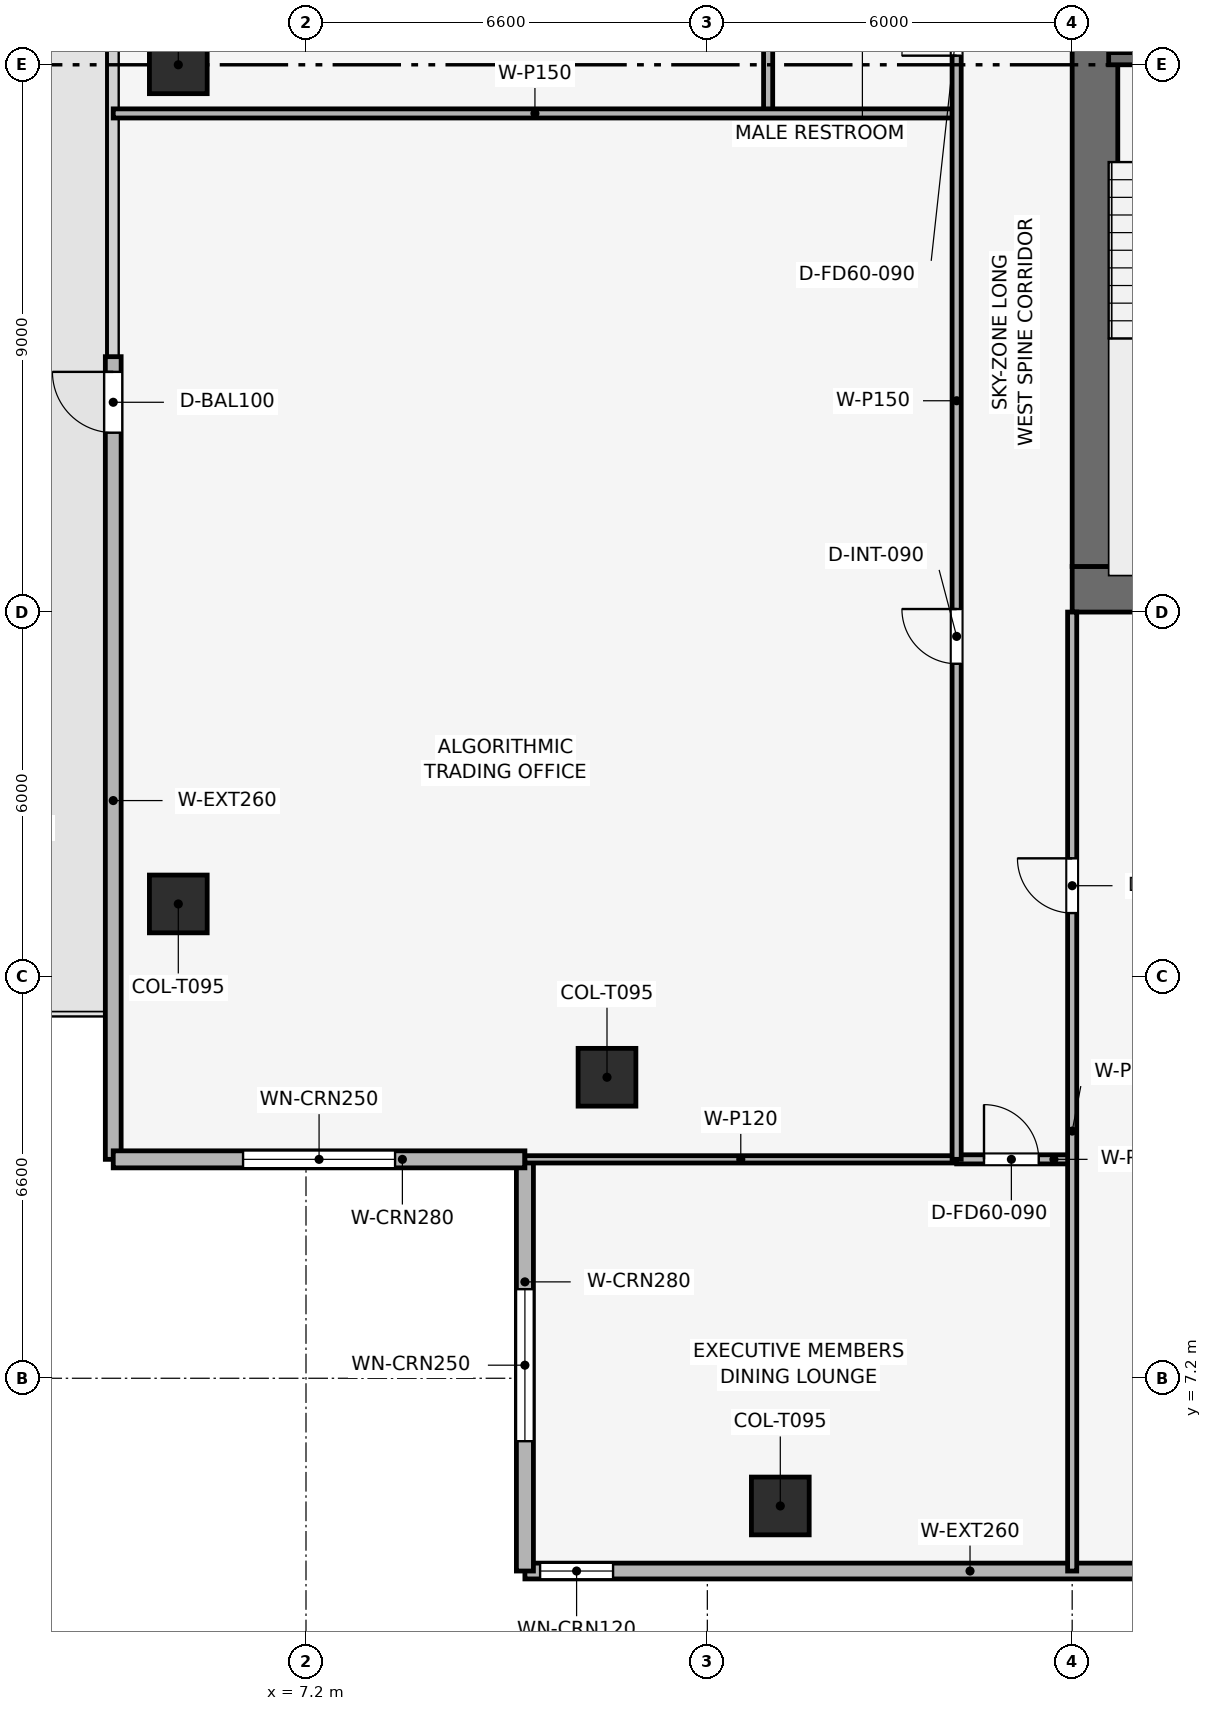
"""IFC4 building model, lengths in metres.
Left out: names, types, materials, properties, quantities, classifications, styles, units other than length and angle.
Written with IfcOpenShell. Run it as: python <this file> out.ifc"""

import sys

from ifc_helpers import new_model, si_unit, direction, frame, frame_2d, origin, origin_2d, place, context, subcontext, project, spatial, rectangle, extrude, element, fill, save


model = new_model("IFC4")
c1 = context("Model", 3, precision=1e-05, world=origin(), true_north=direction((0.0, 1.0)))
c2 = subcontext(c1, "Body", "Model", "MODEL_VIEW")
j1 = project(units=[si_unit("LENGTHUNIT", "METRE"), si_unit("PLANEANGLEUNIT", "RADIAN")], contexts=[c1])
p1 = place(None, origin())
s1 = spatial("IfcSite", under=j1, at=p1, CompositionType="ELEMENT")
p2 = place(p1, origin())
s2 = spatial("IfcBuilding", under=s1, at=p2, CompositionType="ELEMENT")
p3 = place(p2, frame((0.0, 0.0, 261.6)))
s3 = spatial("IfcBuildingStorey", under=s2, at=p3, CompositionType="ELEMENT", Elevation=261.6)
p4 = place(p3, frame((19.8, 20.175, 0.0), z_axis=(0.0, 0.0, 1.0), x_axis=(1.0, 0.0, 0.0)))
e1 = element("IfcWall", 1, at=p4, inside=s3, PredefinedType="SHEAR", context=c2, shape_type="SweptSolid", body=[
    extrude(rectangle(XDim=18.0, YDim=0.75, at=frame_2d((9.0, 0.0))), origin(), (0.0, 0.0, 1.0), 3.75),
])
p5 = place(p3, frame((20.175, 20.55, 0.0), z_axis=(0.0, 0.0, 1.0), x_axis=(0.0, 1.0, 0.0)))
e2 = element("IfcWall", 2, at=p5, inside=s3, PredefinedType="SHEAR", context=c2, shape_type="SweptSolid", body=[
    extrude(rectangle(XDim=16.5, YDim=0.75, at=frame_2d((8.25, 0.0))), origin(), (0.0, 0.0, 1.0), 3.75),
])
p6 = place(p5, frame((10.25, 0.0, 0.0)))
e3 = element("IfcOpeningElement", 3, at=p6, cuts=e2, PredefinedType="OPENING", context=c2, shape_type="SweptSolid", body=[
    extrude(rectangle(XDim=1.1, YDim=2.15, at=frame_2d((0.55, 1.075))), frame((0.0, 0.385, 0.0), z_axis=(0.0, -1.0, 0.0), x_axis=(1.0, 0.0, 0.0)), (0.0, 0.0, 1.0), 0.77),
])
for number, where, z_axis, x_axis in (
    (4, (15.0, 5.1, 0.003), (0.0, 0.0, 1.0), (1.0, 0.0, 0.0)),
    (5, (5.1, 28.8, 0.003), (0.0, 0.0, 1.0), (1.0, 0.0, 0.0)),
    (6, (5.1, 15.0, 0.003), (0.0, 0.0, 1.0), (1.0, 0.0, 0.0)),
    (7, (12.15, 12.15, 0.003), (0.0, 0.0, 1.0), (1.0, 0.0, 0.0)),
):
    element("IfcColumn", number, at=place(p3, frame(where, z_axis=z_axis, x_axis=x_axis)), inside=s3, PredefinedType="COLUMN", context=c2, shape_type="SweptSolid", body=[
        extrude(rectangle(XDim=0.95, YDim=0.95, at=origin_2d()), origin(), (0.0, 0.0, 1.0), 3.494),
    ])
p7 = place(p3, frame((24.0, 4.03, 0.0), z_axis=(0.0, 0.0, 1.0), x_axis=(-1.0, 0.0, 0.0)))
e8 = element("IfcWall", 8, at=p7, inside=s3, PredefinedType="SOLIDWALL", context=c2, shape_type="SweptSolid", body=[
    extrude(rectangle(XDim=13.2, YDim=0.26, at=frame_2d((6.6, 0.0))), origin(), (0.0, 0.0, 1.0), 3.5),
])
p8 = place(p7, frame((11.75, 0.0, 0.9)))
e9 = element("IfcOpeningElement", 9, at=p8, cuts=e8, PredefinedType="OPENING", context=c2, shape_type="SweptSolid", body=[
    extrude(rectangle(XDim=1.2, YDim=2.1, at=frame_2d((0.6, 1.05))), frame((0.0, 0.14, 0.0), z_axis=(0.0, -1.0, 0.0), x_axis=(1.0, 0.0, 0.0)), (0.0, 0.0, 1.0), 0.28),
])
p9 = place(p3, frame((4.03, 10.8, 0.0), z_axis=(0.0, 0.0, 1.0), x_axis=(0.0, 1.0, 0.0)))
e10 = element("IfcWall", 10, at=p9, inside=s3, PredefinedType="SOLIDWALL", context=c2, shape_type="SweptSolid", body=[
    extrude(rectangle(XDim=13.2, YDim=0.26, at=frame_2d((6.6, 0.0))), origin(), (0.0, 0.0, 1.0), 3.5),
])
p10 = place(p9, frame((11.95, 0.0, 0.0)))
e11 = element("IfcOpeningElement", 11, at=p10, cuts=e10, PredefinedType="OPENING", context=c2, shape_type="SweptSolid", body=[
    extrude(rectangle(XDim=1.0, YDim=2.2, at=frame_2d((0.5, 1.1))), frame((0.0, 0.14, 0.0), z_axis=(0.0, -1.0, 0.0), x_axis=(1.0, 0.0, 0.0)), (0.0, 0.0, 1.0), 0.28),
])
p11 = place(p3, frame((10.8, 4.03, 0.0), z_axis=(0.0, 0.0, 1.0), x_axis=(0.0, 1.0, 0.0)))
e12 = element("IfcWall", 12, at=p11, inside=s3, PredefinedType="SOLIDWALL", context=c2, shape_type="SweptSolid", body=[
    extrude(rectangle(XDim=6.77, YDim=0.28, at=frame_2d((3.385, 0.0))), origin(), (0.0, 0.0, 1.0), 3.5),
])
p12 = place(p11, frame((2.135, 0.0, 0.9)))
e13 = element("IfcOpeningElement", 13, at=p12, cuts=e12, PredefinedType="OPENING", context=c2, shape_type="SweptSolid", body=[
    extrude(rectangle(XDim=2.5, YDim=1.9, at=frame_2d((1.25, 0.95))), frame((0.0, 0.15, 0.0), z_axis=(0.0, -1.0, 0.0), x_axis=(1.0, 0.0, 0.0)), (0.0, 0.0, 1.0), 0.3),
])
p13 = place(p3, frame((10.8, 10.8, 0.0), z_axis=(0.0, 0.0, 1.0), x_axis=(-1.0, 0.0, 0.0)))
e14 = element("IfcWall", 14, at=p13, inside=s3, PredefinedType="SOLIDWALL", context=c2, shape_type="SweptSolid", body=[
    extrude(rectangle(XDim=6.77, YDim=0.28, at=frame_2d((3.385, 0.0))), origin(), (0.0, 0.0, 1.0), 3.5),
])
p14 = place(p13, frame((2.135, 0.0, 0.9)))
e15 = element("IfcOpeningElement", 15, at=p14, cuts=e14, PredefinedType="OPENING", context=c2, shape_type="SweptSolid", body=[
    extrude(rectangle(XDim=2.5, YDim=1.9, at=frame_2d((1.25, 0.95))), frame((0.0, 0.15, 0.0), z_axis=(0.0, -1.0, 0.0), x_axis=(1.0, 0.0, 0.0)), (0.0, 0.0, 1.0), 0.3),
])
p15 = place(p3, frame((20.4, 28.9, 0.0), z_axis=(0.0, 0.0, 1.0), x_axis=(1.0, 0.0, 0.0)))
e16 = element("IfcWall", 16, at=p15, inside=s3, PredefinedType="SHEAR", context=c2, shape_type="SweptSolid", body=[
    extrude(rectangle(XDim=3.15, YDim=0.2, at=frame_2d((1.575, 0.0))), origin(), (0.0, 0.0, 1.0), 3.5),
])
p16 = place(p15, frame((0.8, 0.0, 0.0)))
e17 = element("IfcOpeningElement", 17, at=p16, cuts=e16, PredefinedType="OPENING", context=c2, shape_type="SweptSolid", body=[
    extrude(rectangle(XDim=1.0, YDim=2.1, at=frame_2d((0.5, 1.05))), frame((0.0, 0.11, 0.0), z_axis=(0.0, -1.0, 0.0), x_axis=(1.0, 0.0, 0.0)), (0.0, 0.0, 1.0), 0.22),
])
p17 = place(p3, frame((14.8, 28.0, 0.0), z_axis=(0.0, 0.0, 1.0), x_axis=(0.0, 1.0, 0.0)))
e18 = element("IfcWall", 18, at=p17, inside=s3, PredefinedType="PARTITIONING", context=c2, shape_type="SweptSolid", body=[
    extrude(rectangle(XDim=11.7, YDim=0.15, at=frame_2d((5.85, 0.0))), origin(), (0.0, 0.0, 1.0), 3.085),
])
p18 = place(p17, frame((9.6, 0.0, 0.0)))
e19 = element("IfcOpeningElement", 19, at=p18, cuts=e18, PredefinedType="OPENING", context=c2, shape_type="SweptSolid", body=[
    extrude(rectangle(XDim=0.9, YDim=2.1, at=frame_2d((0.45, 1.05))), frame((0.0, 0.085, 0.0), z_axis=(0.0, -1.0, 0.0), x_axis=(1.0, 0.0, 0.0)), (0.0, 0.0, 1.0), 0.17),
])
p19 = place(p3, frame((4.03, 28.0, 0.0), z_axis=(0.0, 0.0, 1.0), x_axis=(1.0, 0.0, 0.0)))
e20 = element("IfcWall", 20, at=p19, inside=s3, PredefinedType="PARTITIONING", context=c2, shape_type="SweptSolid", body=[
    extrude(rectangle(XDim=13.87, YDim=0.15, at=frame_2d((6.935, 0.0))), origin(), (0.0, 0.0, 1.0), 3.085),
])
p20 = place(p3, frame((10.8, 10.8, 0.0), z_axis=(0.0, 0.0, 1.0), x_axis=(1.0, 0.0, 0.0)))
e21 = element("IfcWall", 21, at=p20, inside=s3, PredefinedType="PARTITIONING", context=c2, shape_type="SweptSolid", body=[
    extrude(rectangle(XDim=7.1, YDim=0.12, at=frame_2d((3.55, 0.0))), origin(), (0.0, 0.0, 1.0), 3.085),
])
p21 = place(p3, frame((17.9, 10.8, 0.0), z_axis=(0.0, 0.0, 1.0), x_axis=(1.0, 0.0, 0.0)))
e22 = element("IfcWall", 22, at=p21, inside=s3, PredefinedType="PARTITIONING", context=c2, shape_type="SweptSolid", body=[
    extrude(rectangle(XDim=1.9, YDim=0.15, at=frame_2d((0.95, 0.0))), origin(), (0.0, 0.0, 1.0), 3.5),
])
p22 = place(p21, frame((0.45, 0.0, 0.0)))
e23 = element("IfcOpeningElement", 23, at=p22, cuts=e22, PredefinedType="OPENING", context=c2, shape_type="SweptSolid", body=[
    extrude(rectangle(XDim=0.9, YDim=2.1, at=frame_2d((0.45, 1.05))), frame((0.0, 0.085, 0.0), z_axis=(0.0, -1.0, 0.0), x_axis=(1.0, 0.0, 0.0)), (0.0, 0.0, 1.0), 0.17),
])
p23 = place(p3, frame((19.8, 4.03, 0.0), z_axis=(0.0, 0.0, 1.0), x_axis=(0.0, 1.0, 0.0)))
e24 = element("IfcWall", 24, at=p23, inside=s3, PredefinedType="PARTITIONING", context=c2, shape_type="SweptSolid", body=[
    extrude(rectangle(XDim=15.77, YDim=0.15, at=frame_2d((7.885, 0.0))), origin(), (0.0, 0.0, 1.0), 3.085),
])
p24 = place(p23, frame((10.82, 0.0, 0.0)))
e25 = element("IfcOpeningElement", 25, at=p24, cuts=e24, PredefinedType="OPENING", context=c2, shape_type="SweptSolid", body=[
    extrude(rectangle(XDim=0.9, YDim=2.1, at=frame_2d((0.45, 1.05))), frame((0.0, 0.085, 0.0), z_axis=(0.0, -1.0, 0.0), x_axis=(1.0, 0.0, 0.0)), (0.0, 0.0, 1.0), 0.17),
])
p25 = place(p3, frame((17.9, 10.8, 0.0), z_axis=(0.0, 0.0, 1.0), x_axis=(0.0, 1.0, 0.0)))
e26 = element("IfcWall", 26, at=p25, inside=s3, PredefinedType="PARTITIONING", context=c2, shape_type="SweptSolid", body=[
    extrude(rectangle(XDim=28.9, YDim=0.15, at=frame_2d((14.45, 0.0))), origin(), (0.0, 0.0, 1.0), 3.085),
])
p26 = place(p25, frame((8.15, 0.0, 0.0)))
e27 = element("IfcOpeningElement", 27, at=p26, cuts=e26, PredefinedType="OPENING", context=c2, shape_type="SweptSolid", body=[
    extrude(rectangle(XDim=0.9, YDim=2.1, at=frame_2d((0.45, 1.05))), frame((0.0, 0.085, 0.0), z_axis=(0.0, -1.0, 0.0), x_axis=(1.0, 0.0, 0.0)), (0.0, 0.0, 1.0), 0.17),
])
p27 = place(p25, frame((18.15, 0.0, 0.0)))
e28 = element("IfcOpeningElement", 28, at=p27, cuts=e26, PredefinedType="OPENING", context=c2, shape_type="SweptSolid", body=[
    extrude(rectangle(XDim=0.9, YDim=2.1, at=frame_2d((0.45, 1.05))), frame((0.0, 0.085, 0.0), z_axis=(0.0, -1.0, 0.0), x_axis=(1.0, 0.0, 0.0)), (0.0, 0.0, 1.0), 0.17),
])
p28 = place(p25, frame((21.05, 0.0, 0.0)))
e29 = element("IfcOpeningElement", 29, at=p28, cuts=e26, PredefinedType="OPENING", context=c2, shape_type="SweptSolid", body=[
    extrude(rectangle(XDim=0.9, YDim=2.1, at=frame_2d((0.45, 1.05))), frame((0.0, 0.085, 0.0), z_axis=(0.0, -1.0, 0.0), x_axis=(1.0, 0.0, 0.0)), (0.0, 0.0, 1.0), 0.17),
])
p29 = place(p25, frame((23.8, 0.0, 0.0)))
e30 = element("IfcOpeningElement", 30, at=p29, cuts=e26, PredefinedType="OPENING", context=c2, shape_type="SweptSolid", body=[
    extrude(rectangle(XDim=0.95, YDim=2.1, at=frame_2d((0.475, 1.05))), frame((0.0, 0.085, 0.0), z_axis=(0.0, -1.0, 0.0), x_axis=(1.0, 0.0, 0.0)), (0.0, 0.0, 1.0), 0.17),
])
p30 = place(p25, frame((26.8, 0.0, 0.0)))
e31 = element("IfcOpeningElement", 31, at=p30, cuts=e26, PredefinedType="OPENING", context=c2, shape_type="SweptSolid", body=[
    extrude(rectangle(XDim=0.9, YDim=2.1, at=frame_2d((0.45, 1.05))), frame((0.0, 0.085, 0.0), z_axis=(0.0, -1.0, 0.0), x_axis=(1.0, 0.0, 0.0)), (0.0, 0.0, 1.0), 0.17),
])
p31 = place(p8, origin())
e32 = element("IfcWindow", 32, at=p31, inside=s3, PartitioningType="SINGLE_PANEL", PredefinedType="WINDOW", context=c2, shape_type="SweptSolid", body=[
    extrude(rectangle(XDim=1.2, YDim=2.1, at=frame_2d((0.6, 1.05))), frame((0.0, 0.03, 0.0), z_axis=(0.0, -1.0, 0.0), x_axis=(1.0, 0.0, 0.0)), (0.0, 0.0, 1.0), 0.06),
])
fill(e9, e32)
p32 = place(p10, origin())
e33 = element("IfcDoor", 33, at=p32, inside=s3, OperationType="SINGLE_SWING_RIGHT", PredefinedType="DOOR", context=c2, shape_type="SweptSolid", body=[
    extrude(rectangle(XDim=1.0, YDim=2.2, at=frame_2d((0.5, 1.1))), frame((0.0, 0.025, 0.0), z_axis=(0.0, -1.0, 0.0), x_axis=(1.0, 0.0, 0.0)), (0.0, 0.0, 1.0), 0.05),
])
fill(e11, e33)
p33 = place(p12, origin())
e34 = element("IfcWindow", 34, at=p33, inside=s3, PartitioningType="SINGLE_PANEL", PredefinedType="WINDOW", context=c2, shape_type="SweptSolid", body=[
    extrude(rectangle(XDim=2.5, YDim=1.9, at=frame_2d((1.25, 0.95))), frame((0.0, 0.03, 0.0), z_axis=(0.0, -1.0, 0.0), x_axis=(1.0, 0.0, 0.0)), (0.0, 0.0, 1.0), 0.06),
])
fill(e13, e34)
p34 = place(p14, origin())
e35 = element("IfcWindow", 35, at=p34, inside=s3, PartitioningType="SINGLE_PANEL", PredefinedType="WINDOW", context=c2, shape_type="SweptSolid", body=[
    extrude(rectangle(XDim=2.5, YDim=1.9, at=frame_2d((1.25, 0.95))), frame((0.0, 0.03, 0.0), z_axis=(0.0, -1.0, 0.0), x_axis=(1.0, 0.0, 0.0)), (0.0, 0.0, 1.0), 0.06),
])
fill(e15, e35)
p35 = place(p22, origin())
e36 = element("IfcDoor", 36, at=p35, inside=s3, OperationType="SINGLE_SWING_LEFT", PredefinedType="DOOR", context=c2, shape_type="SweptSolid", body=[
    extrude(rectangle(XDim=0.9, YDim=2.1, at=frame_2d((0.45, 1.05))), frame((0.0, 0.025, 0.0), z_axis=(0.0, -1.0, 0.0), x_axis=(1.0, 0.0, 0.0)), (0.0, 0.0, 1.0), 0.05),
])
fill(e23, e36)
p36 = place(p24, origin())
e37 = element("IfcDoor", 37, at=p36, inside=s3, OperationType="SINGLE_SWING_RIGHT", PredefinedType="DOOR", context=c2, shape_type="SweptSolid", body=[
    extrude(rectangle(XDim=0.9, YDim=2.1, at=frame_2d((0.45, 1.05))), frame((0.0, 0.025, 0.0), z_axis=(0.0, -1.0, 0.0), x_axis=(1.0, 0.0, 0.0)), (0.0, 0.0, 1.0), 0.05),
])
fill(e25, e37)
p37 = place(p26, origin())
e38 = element("IfcDoor", 38, at=p37, inside=s3, OperationType="SINGLE_SWING_RIGHT", PredefinedType="DOOR", context=c2, shape_type="SweptSolid", body=[
    extrude(rectangle(XDim=0.9, YDim=2.1, at=frame_2d((0.45, 1.05))), frame((0.0, 0.025, 0.0), z_axis=(0.0, -1.0, 0.0), x_axis=(1.0, 0.0, 0.0)), (0.0, 0.0, 1.0), 0.05),
])
fill(e27, e38)
p38 = place(p27, origin())
e39 = element("IfcDoor", 39, at=p38, inside=s3, OperationType="SINGLE_SWING_LEFT", PredefinedType="DOOR", context=c2, shape_type="SweptSolid", body=[
    extrude(rectangle(XDim=0.9, YDim=2.1, at=frame_2d((0.45, 1.05))), frame((0.0, 0.025, 0.0), z_axis=(0.0, -1.0, 0.0), x_axis=(1.0, 0.0, 0.0)), (0.0, 0.0, 1.0), 0.05),
])
fill(e28, e39)
save(model, sys.argv[1])
